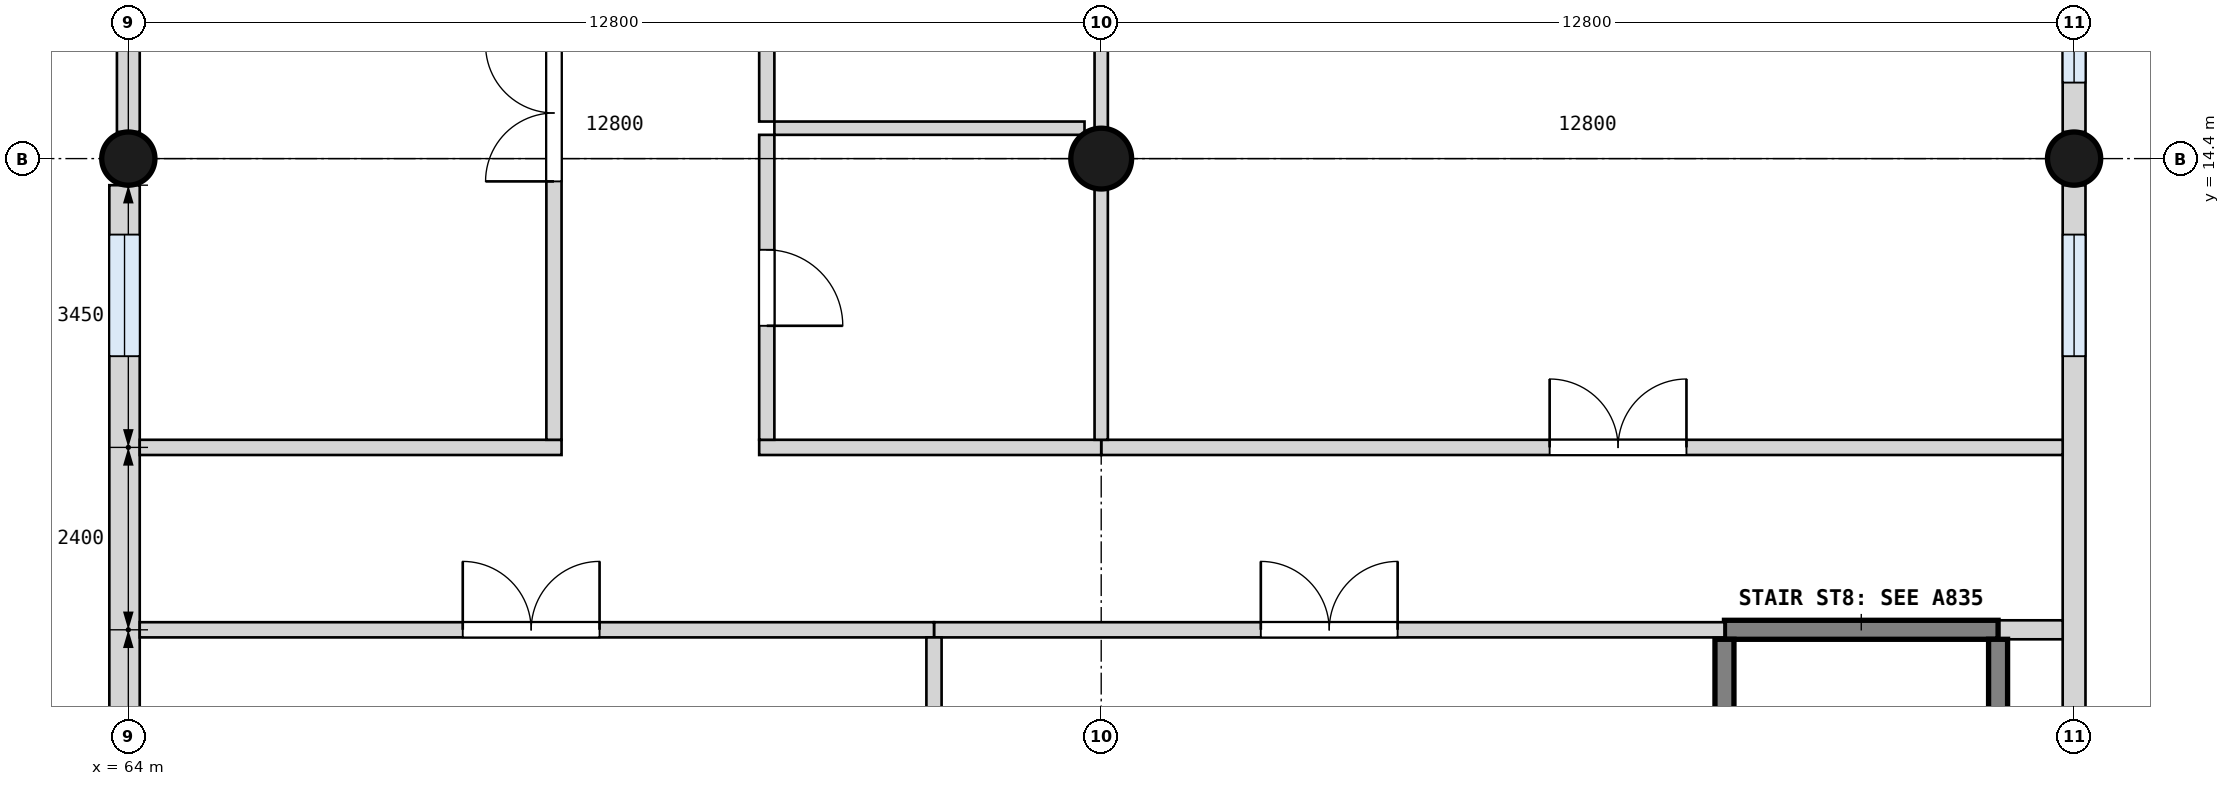
"""IFC4 building model, lengths in metres.
Left out: names, types, materials, properties, quantities, classifications, styles, units other than length and angle.
Written with IfcOpenShell. Run it as: python <this file> out.ifc"""

import sys

from ifc_helpers import new_model, si_unit, direction, frame, frame_2d, origin, origin_2d, place, context, subcontext, project, spatial, rectangle, circle, extrude, element, fill, save


model = new_model("IFC4")
c1 = context("Model", 3, precision=1e-05, world=origin(), true_north=direction((0.0, 1.0)))
c2 = subcontext(c1, "Body", "Model", "MODEL_VIEW")
j1 = project(units=[si_unit("LENGTHUNIT", "METRE"), si_unit("PLANEANGLEUNIT", "RADIAN")], contexts=[c1])
p1 = place(None, origin())
s1 = spatial("IfcSite", under=j1, at=p1, CompositionType="ELEMENT")
p2 = place(p1, origin())
s2 = spatial("IfcBuilding", under=s1, at=p2, CompositionType="ELEMENT")
p3 = place(p2, origin())
s3 = spatial("IfcBuildingStorey", under=s2, at=p3, CompositionType="ELEMENT", Elevation=0.0)
p4 = place(p3, frame((89.6, 14.4, 0.0), z_axis=(0.0, 0.0, 1.0), x_axis=(1.0, 0.0, 0.0)))
e1 = element("IfcColumn", 1, at=p4, inside=s3, PredefinedType="COLUMN", context=c2, shape_type="SweptSolid", body=[
    extrude(circle(Radius=0.35, at=origin_2d()), origin(), (0.0, 0.0, 1.0), 4.2),
])
p5 = place(p3, frame((76.8, 14.4, 0.0), z_axis=(0.0, 0.0, 1.0), x_axis=(1.0, 0.0, 0.0)))
e2 = element("IfcColumn", 2, at=p5, inside=s3, PredefinedType="COLUMN", context=c2, shape_type="SweptSolid", body=[
    extrude(circle(Radius=0.4, at=origin_2d()), origin(), (0.0, 0.0, 1.0), 4.2),
])
p6 = place(p3, frame((64.0, 14.4, 0.0), z_axis=(0.0, 0.0, 1.0), x_axis=(1.0, 0.0, 0.0)))
e3 = element("IfcColumn", 3, at=p6, inside=s3, PredefinedType="COLUMN", context=c2, shape_type="SweptSolid", body=[
    extrude(circle(Radius=0.35, at=origin_2d()), origin(), (0.0, 0.0, 1.0), 4.2),
])
p7 = place(p3, frame((53.4, 14.4, -0.25), z_axis=(0.0, 0.0, 1.0), x_axis=(1.0, 0.0, 0.0)))
e4 = element("IfcWall", 4, at=p7, inside=s3, PredefinedType="SHEAR", context=c2, shape_type="SweptSolid", body=[
    extrude(rectangle(XDim=10.25, YDim=0.4, at=frame_2d((5.125, 0.0))), origin(), (0.0, 0.0, 1.0), 4.45),
])
p8 = place(p7, frame((5.6, 0.0, 0.25)))
e5 = element("IfcOpeningElement", 5, at=p8, cuts=e4, PredefinedType="OPENING", context=c2, shape_type="SweptSolid", body=[
    extrude(rectangle(XDim=1.2, YDim=2.1, at=frame_2d((0.6, 1.05))), frame((0.0, 0.21, 0.0), z_axis=(0.0, -1.0, 0.0), x_axis=(1.0, 0.0, 0.0)), (0.0, 0.0, 1.0), 0.42),
])
p9 = place(p3, frame((63.2, 5.0, -0.25), z_axis=(0.0, 0.0, 1.0), x_axis=(0.0, 1.0, 0.0)))
e6 = element("IfcWall", 6, at=p9, inside=s3, PredefinedType="SHEAR", context=c2, shape_type="SweptSolid", body=[
    extrude(rectangle(XDim=9.2, YDim=0.4, at=frame_2d((4.6, 0.0))), origin(), (0.0, 0.0, 1.0), 4.45),
])
p10 = place(p3, frame((89.6, 0.35, 0.0), z_axis=(0.0, 0.0, 1.0), x_axis=(0.0, 1.0, 0.0)))
e7 = element("IfcWall", 7, at=p10, inside=s3, PredefinedType="SOLIDWALL", context=c2, shape_type="SweptSolid", body=[
    extrude(rectangle(XDim=13.7, YDim=0.3, at=frame_2d((6.85, 0.0))), origin(), (0.0, 0.0, 1.0), 3.0),
])
p11 = place(p10, frame((0.65, 0.0, 0.3)))
e8 = element("IfcOpeningElement", 8, at=p11, cuts=e7, PredefinedType="OPENING", context=c2, shape_type="SweptSolid", body=[
    extrude(rectangle(XDim=1.6, YDim=2.4, at=frame_2d((0.8, 1.2))), frame((0.0, 0.16, 0.0), z_axis=(0.0, -1.0, 0.0), x_axis=(1.0, 0.0, 0.0)), (0.0, 0.0, 1.0), 0.32),
])
p12 = place(p10, frame((4.25, 0.0, 0.3)))
e9 = element("IfcOpeningElement", 9, at=p12, cuts=e7, PredefinedType="OPENING", context=c2, shape_type="SweptSolid", body=[
    extrude(rectangle(XDim=1.6, YDim=2.4, at=frame_2d((0.8, 1.2))), frame((0.0, 0.16, 0.0), z_axis=(0.0, -1.0, 0.0), x_axis=(1.0, 0.0, 0.0)), (0.0, 0.0, 1.0), 0.32),
])
p13 = place(p10, frame((11.45, 0.0, 0.3)))
e10 = element("IfcOpeningElement", 10, at=p13, cuts=e7, PredefinedType="OPENING", context=c2, shape_type="SweptSolid", body=[
    extrude(rectangle(XDim=1.6, YDim=2.4, at=frame_2d((0.8, 1.2))), frame((0.0, 0.16, 0.0), z_axis=(0.0, -1.0, 0.0), x_axis=(1.0, 0.0, 0.0)), (0.0, 0.0, 1.0), 0.32),
])
p14 = place(p3, frame((89.6, 14.75, 0.0), z_axis=(0.0, 0.0, 1.0), x_axis=(0.0, 1.0, 0.0)))
e11 = element("IfcWall", 11, at=p14, inside=s3, PredefinedType="SOLIDWALL", context=c2, shape_type="SweptSolid", body=[
    extrude(rectangle(XDim=13.7, YDim=0.3, at=frame_2d((6.85, 0.0))), origin(), (0.0, 0.0, 1.0), 3.0),
])
p15 = place(p14, frame((0.65, 0.0, 0.3)))
e12 = element("IfcOpeningElement", 12, at=p15, cuts=e11, PredefinedType="OPENING", context=c2, shape_type="SweptSolid", body=[
    extrude(rectangle(XDim=1.6, YDim=2.4, at=frame_2d((0.8, 1.2))), frame((0.0, 0.16, 0.0), z_axis=(0.0, -1.0, 0.0), x_axis=(1.0, 0.0, 0.0)), (0.0, 0.0, 1.0), 0.32),
])
p16 = place(p14, frame((7.85, 0.0, 0.3)))
e13 = element("IfcOpeningElement", 13, at=p16, cuts=e11, PredefinedType="OPENING", context=c2, shape_type="SweptSolid", body=[
    extrude(rectangle(XDim=1.6, YDim=2.4, at=frame_2d((0.8, 1.2))), frame((0.0, 0.16, 0.0), z_axis=(0.0, -1.0, 0.0), x_axis=(1.0, 0.0, 0.0)), (0.0, 0.0, 1.0), 0.32),
])
p17 = place(p14, frame((11.45, 0.0, 0.3)))
e14 = element("IfcOpeningElement", 14, at=p17, cuts=e11, PredefinedType="OPENING", context=c2, shape_type="SweptSolid", body=[
    extrude(rectangle(XDim=1.6, YDim=2.4, at=frame_2d((0.8, 1.2))), frame((0.0, 0.16, 0.0), z_axis=(0.0, -1.0, 0.0), x_axis=(1.0, 0.0, 0.0)), (0.0, 0.0, 1.0), 0.32),
])
p18 = place(p3, frame((63.95, 0.35, 0.0), z_axis=(0.0, 0.0, 1.0), x_axis=(0.0, 1.0, 0.0)))
e15 = element("IfcWall", 15, at=p18, inside=s3, PredefinedType="SOLIDWALL", context=c2, shape_type="SweptSolid", body=[
    extrude(rectangle(XDim=13.7, YDim=0.4, at=frame_2d((6.85, 0.0))), origin(), (0.0, 0.0, 1.0), 3.0),
])
p19 = place(p18, frame((0.65, 0.0, 0.3)))
e16 = element("IfcOpeningElement", 16, at=p19, cuts=e15, PredefinedType="OPENING", context=c2, shape_type="SweptSolid", body=[
    extrude(rectangle(XDim=1.6, YDim=2.4, at=frame_2d((0.8, 1.2))), frame((0.0, 0.21, 0.0), z_axis=(0.0, -1.0, 0.0), x_axis=(1.0, 0.0, 0.0)), (0.0, 0.0, 1.0), 0.42),
])
p20 = place(p18, frame((11.45, 0.0, 0.3)))
e17 = element("IfcOpeningElement", 17, at=p20, cuts=e15, PredefinedType="OPENING", context=c2, shape_type="SweptSolid", body=[
    extrude(rectangle(XDim=1.6, YDim=2.4, at=frame_2d((0.8, 1.2))), frame((0.0, 0.21, 0.0), z_axis=(0.0, -1.0, 0.0), x_axis=(1.0, 0.0, 0.0)), (0.0, 0.0, 1.0), 0.42),
])
p21 = place(p3, frame((64.0, 14.75, 0.0), z_axis=(0.0, 0.0, 1.0), x_axis=(0.0, 1.0, 0.0)))
e18 = element("IfcWall", 18, at=p21, inside=s3, PredefinedType="SOLIDWALL", context=c2, shape_type="SweptSolid", body=[
    extrude(rectangle(XDim=4.45, YDim=0.3, at=frame_2d((2.225, 0.0))), origin(), (0.0, 0.0, 1.0), 3.0),
])
p22 = place(p21, frame((1.25, 0.0, 0.3)))
e19 = element("IfcOpeningElement", 19, at=p22, cuts=e18, PredefinedType="OPENING", context=c2, shape_type="SweptSolid", body=[
    extrude(rectangle(XDim=1.6, YDim=2.4, at=frame_2d((0.8, 1.2))), frame((0.0, 0.16, 0.0), z_axis=(0.0, -1.0, 0.0), x_axis=(1.0, 0.0, 0.0)), (0.0, 0.0, 1.0), 0.32),
])
p23 = place(p3, frame((89.45, 8.2, 0.0), z_axis=(0.0, 0.0, 1.0), x_axis=(-1.0, 0.0, 0.0)))
e20 = element("IfcWall", 20, at=p23, inside=s3, PredefinedType="PARTITIONING", context=c2, shape_type="SweptSolid", body=[
    extrude(rectangle(XDim=0.85, YDim=0.25, at=frame_2d((0.425, 0.0))), origin(), (0.0, 0.0, 1.0), 3.9),
])
p24 = place(p3, frame((88.6, 8.2, 0.0), z_axis=(0.0, 0.0, 1.0), x_axis=(-1.0, 0.0, 0.0)))
e21 = element("IfcWall", 21, at=p24, inside=s3, PredefinedType="SHEAR", context=c2, shape_type="SweptSolid", body=[
    extrude(rectangle(XDim=3.6, YDim=0.25, at=frame_2d((1.8, 0.0))), origin(), (0.0, 0.0, 1.0), 3.9),
])
p25 = place(p3, frame((85.0, 8.2, 0.0), z_axis=(0.0, 0.0, 1.0), x_axis=(-1.0, 0.0, 0.0)))
e22 = element("IfcWall", 22, at=p25, inside=s3, PredefinedType="PARTITIONING", context=c2, shape_type="SweptSolid", body=[
    extrude(rectangle(XDim=10.4, YDim=0.2, at=frame_2d((5.2, 0.0))), origin(), (0.0, 0.0, 1.0), 3.9),
])
p26 = place(p25, frame((4.3, 0.0, 0.0)))
e23 = element("IfcOpeningElement", 23, at=p26, cuts=e22, PredefinedType="OPENING", context=c2, shape_type="SweptSolid", body=[
    extrude(rectangle(XDim=1.8, YDim=2.1, at=frame_2d((0.9, 1.05))), frame((0.0, 0.11, 0.0), z_axis=(0.0, -1.0, 0.0), x_axis=(1.0, 0.0, 0.0)), (0.0, 0.0, 1.0), 0.22),
])
p27 = place(p3, frame((74.6, 8.2, 0.0), z_axis=(0.0, 0.0, 1.0), x_axis=(-1.0, 0.0, 0.0)))
e24 = element("IfcWall", 24, at=p27, inside=s3, PredefinedType="PARTITIONING", context=c2, shape_type="SweptSolid", body=[
    extrude(rectangle(XDim=10.45, YDim=0.2, at=frame_2d((5.225, 0.0))), origin(), (0.0, 0.0, 1.0), 3.9),
])
p28 = place(p27, frame((4.4, 0.0, 0.0)))
e25 = element("IfcOpeningElement", 25, at=p28, cuts=e24, PredefinedType="OPENING", context=c2, shape_type="SweptSolid", body=[
    extrude(rectangle(XDim=1.8, YDim=2.1, at=frame_2d((0.9, 1.05))), frame((0.0, 0.11, 0.0), z_axis=(0.0, -1.0, 0.0), x_axis=(1.0, 0.0, 0.0)), (0.0, 0.0, 1.0), 0.22),
])
p29 = place(p3, frame((89.45, 10.6, 0.0), z_axis=(0.0, 0.0, 1.0), x_axis=(-1.0, 0.0, 0.0)))
e26 = element("IfcWall", 26, at=p29, inside=s3, PredefinedType="PARTITIONING", context=c2, shape_type="SweptSolid", body=[
    extrude(rectangle(XDim=12.65, YDim=0.2, at=frame_2d((6.325, 0.0))), origin(), (0.0, 0.0, 1.0), 3.9),
])
p30 = place(p29, frame((4.95, 0.0, 0.0)))
e27 = element("IfcOpeningElement", 27, at=p30, cuts=e26, PredefinedType="OPENING", context=c2, shape_type="SweptSolid", body=[
    extrude(rectangle(XDim=1.8, YDim=2.1, at=frame_2d((0.9, 1.05))), frame((0.0, 0.11, 0.0), z_axis=(0.0, -1.0, 0.0), x_axis=(1.0, 0.0, 0.0)), (0.0, 0.0, 1.0), 0.22),
])
p31 = place(p3, frame((76.8, 10.6, 0.0), z_axis=(0.0, 0.0, 1.0), x_axis=(-1.0, 0.0, 0.0)))
e28 = element("IfcWall", 28, at=p31, inside=s3, PredefinedType="PARTITIONING", context=c2, shape_type="SweptSolid", body=[
    extrude(rectangle(XDim=4.5, YDim=0.2, at=frame_2d((2.25, 0.0))), origin(), (0.0, 0.0, 1.0), 3.9),
])
p32 = place(p3, frame((69.7, 10.6, 0.0), z_axis=(0.0, 0.0, 1.0), x_axis=(-1.0, 0.0, 0.0)))
e29 = element("IfcWall", 29, at=p32, inside=s3, PredefinedType="PARTITIONING", context=c2, shape_type="SweptSolid", body=[
    extrude(rectangle(XDim=5.55, YDim=0.2, at=frame_2d((2.775, 0.0))), origin(), (0.0, 0.0, 1.0), 3.9),
])
p33 = place(p3, frame((76.581, 14.8, 0.0), z_axis=(0.0, 0.0, 1.0), x_axis=(-1.0, 0.0, 0.0)))
e30 = element("IfcWall", 30, at=p33, inside=s3, PredefinedType="PARTITIONING", context=c2, shape_type="SweptSolid", body=[
    extrude(rectangle(XDim=4.081, YDim=0.175, at=frame_2d((2.04, 0.0))), origin(), (0.0, 0.0, 1.0), 3.9),
])
p34 = place(p3, frame((88.6, 2.325, 0.0), z_axis=(0.0, 0.0, 1.0), x_axis=(0.0, 1.0, 0.0)))
e31 = element("IfcWall", 31, at=p34, inside=s3, PredefinedType="SHEAR", context=c2, shape_type="SweptSolid", body=[
    extrude(rectangle(XDim=5.75, YDim=0.25, at=frame_2d((2.875, 0.0))), origin(), (0.0, 0.0, 1.0), 3.9),
])
p35 = place(p3, frame((85.0, 2.325, 0.0), z_axis=(0.0, 0.0, 1.0), x_axis=(0.0, 1.0, 0.0)))
e32 = element("IfcWall", 32, at=p35, inside=s3, PredefinedType="SHEAR", context=c2, shape_type="SweptSolid", body=[
    extrude(rectangle(XDim=5.75, YDim=0.25, at=frame_2d((2.875, 0.0))), origin(), (0.0, 0.0, 1.0), 3.9),
])
p36 = place(p35, frame((0.105, 0.0, 0.0)))
e33 = element("IfcOpeningElement", 33, at=p36, cuts=e32, PredefinedType="OPENING", context=c2, shape_type="SweptSolid", body=[
    extrude(rectangle(XDim=1.2, YDim=2.1, at=frame_2d((0.6, 1.05))), frame((0.0, 0.135, 0.0), z_axis=(0.0, -1.0, 0.0), x_axis=(1.0, 0.0, 0.0)), (0.0, 0.0, 1.0), 0.27),
])
p37 = place(p3, frame((76.8, 10.7, 0.0), z_axis=(0.0, 0.0, 1.0), x_axis=(0.0, 1.0, 0.0)))
e34 = element("IfcWall", 34, at=p37, inside=s3, PredefinedType="PARTITIONING", context=c2, shape_type="SweptSolid", body=[
    extrude(rectangle(XDim=3.3, YDim=0.175, at=frame_2d((1.65, 0.0))), origin(), (0.0, 0.0, 1.0), 3.0),
])
p38 = place(p3, frame((76.8, 14.8, 0.0), z_axis=(0.0, 0.0, 1.0), x_axis=(0.0, 1.0, 0.0)))
e35 = element("IfcWall", 35, at=p38, inside=s3, PredefinedType="PARTITIONING", context=c2, shape_type="SweptSolid", body=[
    extrude(rectangle(XDim=4.712, YDim=0.175, at=frame_2d((2.356, 0.0))), origin(), (0.0, 0.0, 1.0), 3.0),
])
p39 = place(p3, frame((74.6, 0.15, 0.0), z_axis=(0.0, 0.0, 1.0), x_axis=(0.0, 1.0, 0.0)))
e36 = element("IfcWall", 36, at=p39, inside=s3, PredefinedType="PARTITIONING", context=c2, shape_type="SweptSolid", body=[
    extrude(rectangle(XDim=7.95, YDim=0.2, at=frame_2d((3.975, 0.0))), origin(), (0.0, 0.0, 1.0), 3.9),
])
p40 = place(p39, frame((2.95, 0.0, 0.0)))
e37 = element("IfcOpeningElement", 37, at=p40, cuts=e36, PredefinedType="OPENING", context=c2, shape_type="SweptSolid", body=[
    extrude(rectangle(XDim=1.8, YDim=2.1, at=frame_2d((0.9, 1.05))), frame((0.0, 0.11, 0.0), z_axis=(0.0, -1.0, 0.0), x_axis=(1.0, 0.0, 0.0)), (0.0, 0.0, 1.0), 0.22),
])
p41 = place(p3, frame((72.4, 10.7, 0.0), z_axis=(0.0, 0.0, 1.0), x_axis=(0.0, 1.0, 0.0)))
e38 = element("IfcWall", 38, at=p41, inside=s3, PredefinedType="PARTITIONING", context=c2, shape_type="SweptSolid", body=[
    extrude(rectangle(XDim=4.012, YDim=0.2, at=frame_2d((2.006, 0.0))), origin(), (0.0, 0.0, 1.0), 3.9),
])
p42 = place(p41, frame((1.5, 0.0, 0.0)))
e39 = element("IfcOpeningElement", 39, at=p42, cuts=e38, PredefinedType="OPENING", context=c2, shape_type="SweptSolid", body=[
    extrude(rectangle(XDim=1.0, YDim=2.1, at=frame_2d((0.5, 1.05))), frame((0.0, 0.11, 0.0), z_axis=(0.0, -1.0, 0.0), x_axis=(1.0, 0.0, 0.0)), (0.0, 0.0, 1.0), 0.22),
])
p43 = place(p3, frame((72.4, 14.887, 0.0), z_axis=(0.0, 0.0, 1.0), x_axis=(0.0, 1.0, 0.0)))
e40 = element("IfcWall", 40, at=p43, inside=s3, PredefinedType="PARTITIONING", context=c2, shape_type="SweptSolid", body=[
    extrude(rectangle(XDim=4.613, YDim=0.2, at=frame_2d((2.306, 0.0))), origin(), (0.0, 0.0, 1.0), 3.9),
])
p44 = place(p43, frame((1.762, 0.0, 0.0)))
e41 = element("IfcOpeningElement", 41, at=p44, cuts=e40, PredefinedType="OPENING", context=c2, shape_type="SweptSolid", body=[
    extrude(rectangle(XDim=1.1, YDim=2.1, at=frame_2d((0.55, 1.05))), frame((0.0, 0.11, 0.0), z_axis=(0.0, -1.0, 0.0), x_axis=(1.0, 0.0, 0.0)), (0.0, 0.0, 1.0), 0.22),
])
p45 = place(p3, frame((69.6, 10.7, 0.0), z_axis=(0.0, 0.0, 1.0), x_axis=(0.0, 1.0, 0.0)))
e42 = element("IfcWall", 42, at=p45, inside=s3, PredefinedType="PARTITIONING", context=c2, shape_type="SweptSolid", body=[
    extrude(rectangle(XDim=18.0, YDim=0.2, at=frame_2d((9.0, 0.0))), origin(), (0.0, 0.0, 1.0), 3.9),
])
p46 = place(p45, frame((3.4, 0.0, 0.0)))
e43 = element("IfcOpeningElement", 43, at=p46, cuts=e42, PredefinedType="OPENING", context=c2, shape_type="SweptSolid", body=[
    extrude(rectangle(XDim=1.8, YDim=2.1, at=frame_2d((0.9, 1.05))), frame((0.0, 0.11, 0.0), z_axis=(0.0, -1.0, 0.0), x_axis=(1.0, 0.0, 0.0)), (0.0, 0.0, 1.0), 0.22),
])
p47 = place(p26, frame((1.8, 0.0, 0.0), z_axis=(0.0, 0.0, 1.0), x_axis=(-1.0, 0.0, 0.0)))
e44 = element("IfcDoor", 44, at=p47, inside=s3, OperationType="DOUBLE_DOOR_SINGLE_SWING", PredefinedType="DOOR", context=c2, shape_type="SweptSolid", body=[
    extrude(rectangle(XDim=1.8, YDim=2.1, at=frame_2d((0.9, 1.05))), frame((0.0, 0.025, 0.0), z_axis=(0.0, -1.0, 0.0), x_axis=(1.0, 0.0, 0.0)), (0.0, 0.0, 1.0), 0.05),
])
fill(e23, e44)
p48 = place(p28, frame((1.8, 0.0, 0.0), z_axis=(0.0, 0.0, 1.0), x_axis=(-1.0, 0.0, 0.0)))
e45 = element("IfcDoor", 45, at=p48, inside=s3, OperationType="DOUBLE_DOOR_SINGLE_SWING", PredefinedType="DOOR", context=c2, shape_type="SweptSolid", body=[
    extrude(rectangle(XDim=1.8, YDim=2.1, at=frame_2d((0.9, 1.05))), frame((0.0, 0.025, 0.0), z_axis=(0.0, -1.0, 0.0), x_axis=(1.0, 0.0, 0.0)), (0.0, 0.0, 1.0), 0.05),
])
fill(e25, e45)
p49 = place(p30, frame((1.8, 0.0, 0.0), z_axis=(0.0, 0.0, 1.0), x_axis=(-1.0, 0.0, 0.0)))
e46 = element("IfcDoor", 46, at=p49, inside=s3, OperationType="DOUBLE_DOOR_SINGLE_SWING", PredefinedType="DOOR", context=c2, shape_type="SweptSolid", body=[
    extrude(rectangle(XDim=1.8, YDim=2.1, at=frame_2d((0.9, 1.05))), frame((0.0, 0.025, 0.0), z_axis=(0.0, -1.0, 0.0), x_axis=(1.0, 0.0, 0.0)), (0.0, 0.0, 1.0), 0.05),
])
fill(e27, e46)
p50 = place(p42, frame((1.0, 0.0, 0.0), z_axis=(0.0, 0.0, 1.0), x_axis=(-1.0, 0.0, 0.0)))
e47 = element("IfcDoor", 47, at=p50, inside=s3, OperationType="SINGLE_SWING_RIGHT", PredefinedType="DOOR", context=c2, shape_type="SweptSolid", body=[
    extrude(rectangle(XDim=1.0, YDim=2.1, at=frame_2d((0.5, 1.05))), frame((0.0, 0.025, 0.0), z_axis=(0.0, -1.0, 0.0), x_axis=(1.0, 0.0, 0.0)), (0.0, 0.0, 1.0), 0.05),
])
fill(e39, e47)
p51 = place(p46, origin())
e48 = element("IfcDoor", 48, at=p51, inside=s3, OperationType="DOUBLE_DOOR_SINGLE_SWING", PredefinedType="DOOR", context=c2, shape_type="SweptSolid", body=[
    extrude(rectangle(XDim=1.8, YDim=2.1, at=frame_2d((0.9, 1.05))), frame((0.0, 0.025, 0.0), z_axis=(0.0, -1.0, 0.0), x_axis=(1.0, 0.0, 0.0)), (0.0, 0.0, 1.0), 0.05),
])
fill(e43, e48)
p52 = place(p13, origin())
e49 = element("IfcWindow", 49, at=p52, inside=s3, PartitioningType="SINGLE_PANEL", PredefinedType="WINDOW", context=c2, shape_type="SweptSolid", body=[
    extrude(rectangle(XDim=1.6, YDim=2.4, at=frame_2d((0.8, 1.2))), frame((0.0, 0.03, 0.0), z_axis=(0.0, -1.0, 0.0), x_axis=(1.0, 0.0, 0.0)), (0.0, 0.0, 1.0), 0.06),
])
fill(e10, e49)
p53 = place(p15, origin())
e50 = element("IfcWindow", 50, at=p53, inside=s3, PartitioningType="SINGLE_PANEL", PredefinedType="WINDOW", context=c2, shape_type="SweptSolid", body=[
    extrude(rectangle(XDim=1.6, YDim=2.4, at=frame_2d((0.8, 1.2))), frame((0.0, 0.03, 0.0), z_axis=(0.0, -1.0, 0.0), x_axis=(1.0, 0.0, 0.0)), (0.0, 0.0, 1.0), 0.06),
])
fill(e12, e50)
p54 = place(p20, origin())
e51 = element("IfcWindow", 51, at=p54, inside=s3, PartitioningType="SINGLE_PANEL", PredefinedType="WINDOW", context=c2, shape_type="SweptSolid", body=[
    extrude(rectangle(XDim=1.6, YDim=2.4, at=frame_2d((0.8, 1.2))), frame((0.0, 0.03, 0.0), z_axis=(0.0, -1.0, 0.0), x_axis=(1.0, 0.0, 0.0)), (0.0, 0.0, 1.0), 0.06),
])
fill(e17, e51)
save(model, sys.argv[1])
